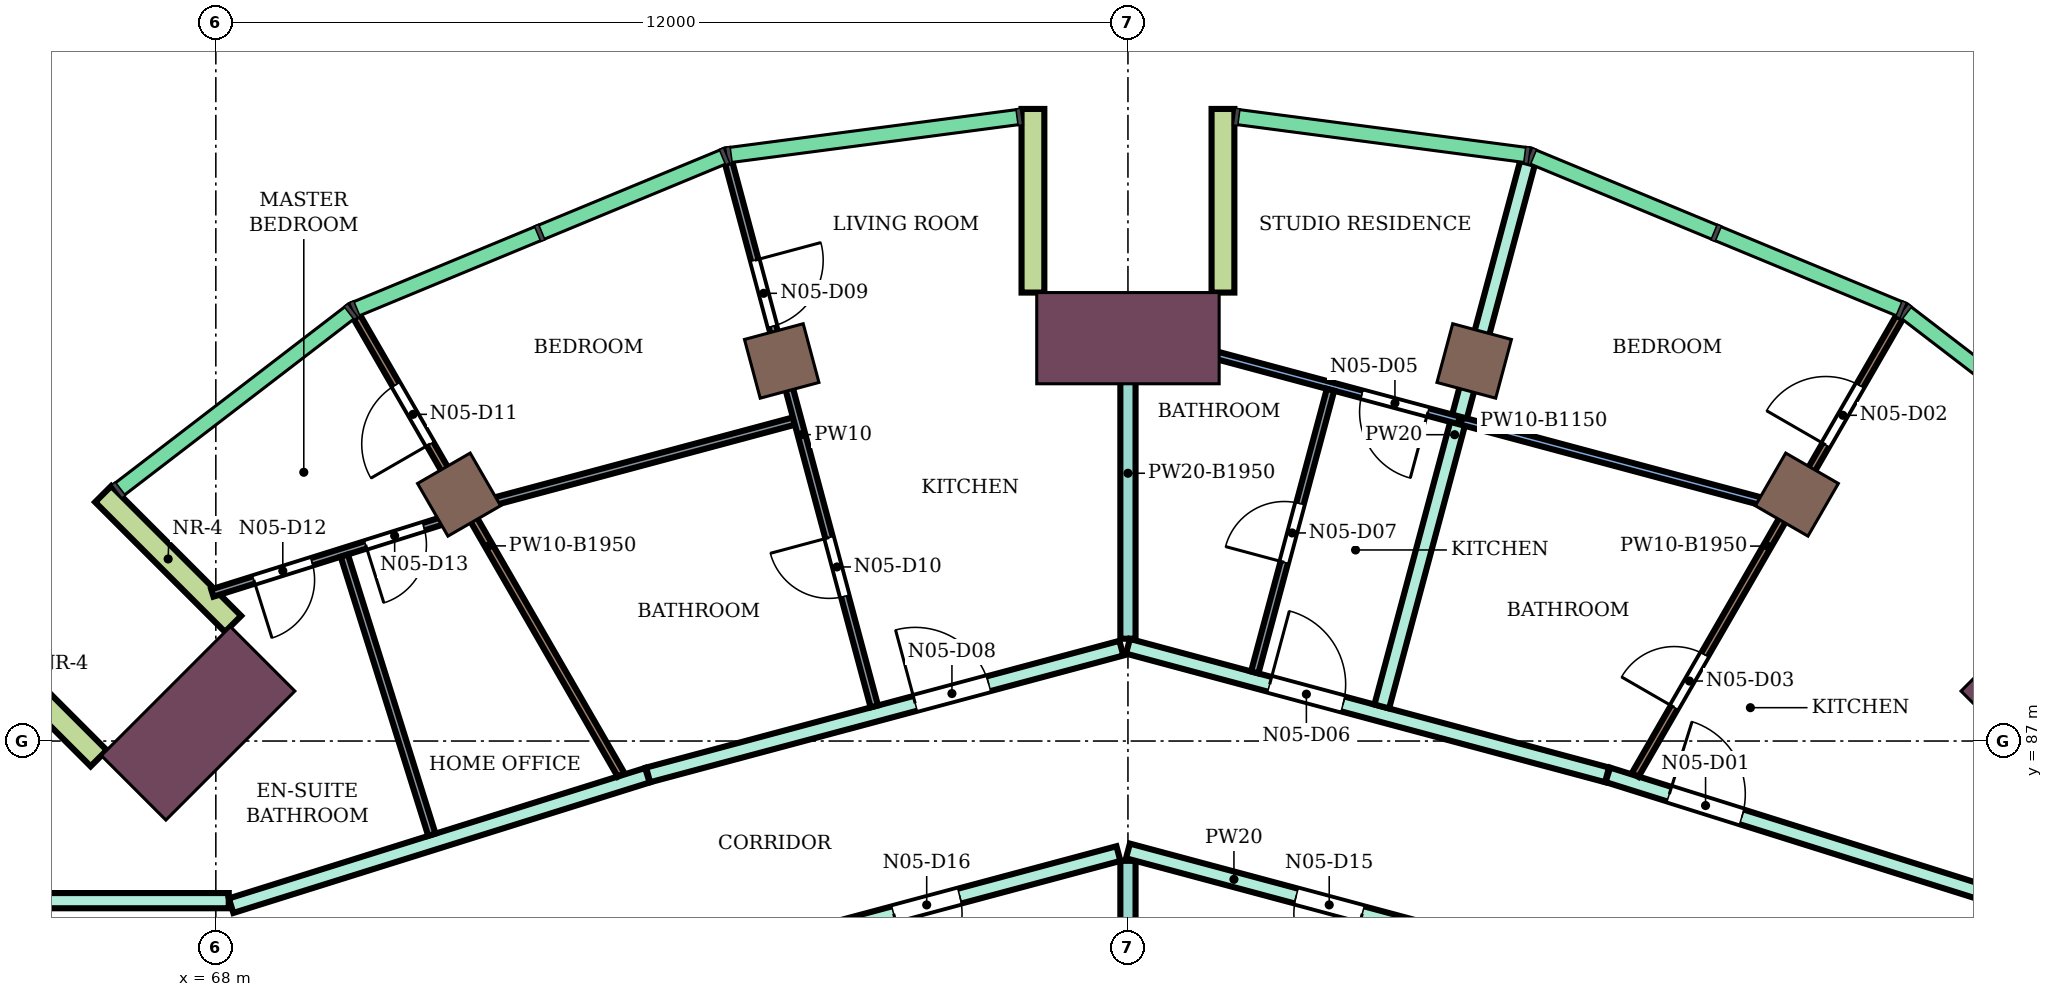
"""IFC4 building model, lengths in metres.
Left out: names, types, materials, properties, quantities, classifications, styles, units other than length and angle.
Written with IfcOpenShell. Run it as: python <this file> out.ifc"""

import sys

from ifc_helpers import new_model, si_unit, direction, frame, frame_2d, origin, origin_2d, place, context, subcontext, project, spatial, rectangle, extrude, element, fill, save


model = new_model("IFC4")
c1 = context("Model", 3, precision=1e-05, world=origin(), true_north=direction((0.0, 1.0)))
c2 = subcontext(c1, "Body", "Model", "MODEL_VIEW")
j1 = project(units=[si_unit("LENGTHUNIT", "METRE"), si_unit("PLANEANGLEUNIT", "RADIAN")], contexts=[c1])
p1 = place(None, origin())
s1 = spatial("IfcSite", under=j1, at=p1, CompositionType="ELEMENT")
p2 = place(p1, origin())
s2 = spatial("IfcBuilding", under=s1, at=p2, CompositionType="ELEMENT")
p3 = place(p2, frame((0.0, 0.0, 323.7)))
s3 = spatial("IfcBuildingStorey", under=s2, at=p3, CompositionType="ELEMENT", Elevation=323.7)
for number, where, z_axis, x_axis in (
    (1, (88.8, 90.242, 0.0), (0.0, 0.0, 1.0), (0.5, 0.866, 0.0)),
    (2, (84.555, 92.0, 0.0), (0.0, 0.0, 1.0), (0.259, 0.966, 0.0)),
    (3, (75.445, 92.0, 0.0), (0.0, 0.0, 1.0), (-0.259, 0.966, 0.0)),
    (4, (71.2, 90.242, 0.0), (0.0, 0.0, 1.0), (-0.5, 0.866, 0.0)),
):
    element("IfcColumn", number, at=place(p3, frame(where, z_axis=z_axis, x_axis=x_axis)), inside=s3, PredefinedType="COLUMN", context=c2, shape_type="SweptSolid", body=[
        extrude(rectangle(XDim=0.8, YDim=0.8, at=origin_2d()), origin(), (0.0, 0.0, 1.0), 4.4),
    ])
for number, where, z_axis, x_axis in (
    (5, (92.233, 87.233, 0.0), (0.0, 0.0, 1.0), (0.707, 0.707, 0.0)),
    (6, (80.0, 92.3, 0.0), (0.0, 0.0, 1.0), (0.0, 1.0, 0.0)),
    (7, (67.767, 87.233, 0.0), (0.0, 0.0, 1.0), (-0.707, 0.707, 0.0)),
):
    element("IfcColumn", number, at=place(p3, frame(where, z_axis=z_axis, x_axis=x_axis)), inside=s3, PredefinedType="COLUMN", context=c2, shape_type="SweptSolid", body=[
        extrude(rectangle(XDim=1.2, YDim=2.4, at=origin_2d()), origin(), (0.0, 0.0, 1.0), 4.4),
    ])
for number, where, z_axis, x_axis in (
    (8, (81.25, 92.9, 0.0), (0.0, 0.0, 1.0), (0.0, 1.0, 0.0)),
    (9, (78.75, 92.9, 0.0), (0.0, 0.0, 1.0), (0.0, 1.0, 0.0)),
    (10, (68.227, 88.541, 0.0), (0.0, 0.0, 1.0), (-0.707, 0.707, 0.0)),
    (11, (66.459, 86.773, 0.0), (0.0, 0.0, 1.0), (-0.707, 0.707, 0.0)),
):
    element("IfcWall", number, at=place(p3, frame(where, z_axis=z_axis, x_axis=x_axis)), inside=s3, PredefinedType="NOTDEFINED", context=c2, shape_type="SweptSolid", body=[
        extrude(rectangle(XDim=2.416, YDim=0.3, at=frame_2d((1.208, 0.0))), origin(), (0.0, 0.0, 1.0), 4.4),
    ])
p4 = place(p3, frame((65.2, 84.9, 0.0), z_axis=(0.0, 0.0, 1.0), x_axis=(1.0, 0.0, 0.0)))
e12 = element("IfcWall", 12, at=p4, inside=s3, PredefinedType="PARTITIONING", context=c2, shape_type="SweptSolid", body=[
    extrude(rectangle(XDim=2.97, YDim=0.2, at=frame_2d((1.485, 0.0))), origin(), (0.0, 0.0, 1.0), 3.95),
])
p5 = place(p3, frame((68.201, 84.834, 0.0), z_axis=(0.0, 0.0, 1.0), x_axis=(0.954232917497, 0.29906443982, 0.0)))
e13 = element("IfcWall", 13, at=p5, inside=s3, PredefinedType="PARTITIONING", context=c2, shape_type="SweptSolid", body=[
    extrude(rectangle(XDim=5.74, YDim=0.2, at=frame_2d((2.87, 0.0))), origin(), (0.0, 0.0, 1.0), 3.95),
])
p6 = place(p3, frame((73.687, 86.554, 0.0), z_axis=(0.0, 0.0, 1.0), x_axis=(0.96595903825, 0.258695064551, 0.0)))
e14 = element("IfcWall", 14, at=p6, inside=s3, PredefinedType="PARTITIONING", context=c2, shape_type="SweptSolid", body=[
    extrude(rectangle(XDim=6.446, YDim=0.2, at=frame_2d((3.223, 0.0))), origin(), (0.0, 0.0, 1.0), 3.95),
])
p7 = place(p6, frame((3.638, 0.0, 0.0)))
e15 = element("IfcOpeningElement", 15, at=p7, cuts=e14, PredefinedType="OPENING", context=c2, shape_type="SweptSolid", body=[
    extrude(rectangle(XDim=1.0, YDim=2.1, at=frame_2d((0.5, 1.05))), frame((0.0, 0.11, 0.0), z_axis=(0.0, -1.0, 0.0), x_axis=(1.0, 0.0, 0.0)), (0.0, 0.0, 1.0), 0.22),
])
p8 = place(p3, frame((74.413, 84.057, 0.0), z_axis=(0.0, 0.0, 1.0), x_axis=(0.965972135939, 0.258646153246, 0.0)))
e16 = element("IfcWall", 16, at=p8, inside=s3, PredefinedType="PARTITIONING", context=c2, shape_type="SweptSolid", body=[
    extrude(rectangle(XDim=5.654, YDim=0.2, at=frame_2d((2.827, 0.0))), origin(), (0.0, 0.0, 1.0), 3.95),
])
p9 = place(p8, frame((2.593, 0.0, 0.0)))
e17 = element("IfcOpeningElement", 17, at=p9, cuts=e16, PredefinedType="OPENING", context=c2, shape_type="SweptSolid", body=[
    extrude(rectangle(XDim=0.9, YDim=2.1, at=frame_2d((0.45, 1.05))), frame((0.0, 0.11, 0.0), z_axis=(0.0, -1.0, 0.0), x_axis=(1.0, 0.0, 0.0)), (0.0, 0.0, 1.0), 0.22),
])
p10 = place(p3, frame((80.0, 82.699, 0.0), z_axis=(0.0, 0.0, 1.0), x_axis=(0.0, 1.0, 0.0)))
e18 = element("IfcWall", 18, at=p10, inside=s3, PredefinedType="PARTITIONING", context=c2, shape_type="SweptSolid", body=[
    extrude(rectangle(XDim=2.725, YDim=0.2, at=frame_2d((1.363, 0.0))), origin(), (0.0, 0.0, 1.0), 2.45),
])
p11 = place(p3, frame((80.0, 85.554, 0.0), z_axis=(0.0, 0.0, 1.0), x_axis=(0.965928989968, -0.258807237802, 0.0)))
e19 = element("IfcWall", 19, at=p11, inside=s3, PredefinedType="PARTITIONING", context=c2, shape_type="SweptSolid", body=[
    extrude(rectangle(XDim=5.774, YDim=0.2, at=frame_2d((2.887, 0.0))), origin(), (0.0, 0.0, 1.0), 3.95),
])
p12 = place(p11, frame((2.292, 0.0, 0.0)))
e20 = element("IfcOpeningElement", 20, at=p12, cuts=e19, PredefinedType="OPENING", context=c2, shape_type="SweptSolid", body=[
    extrude(rectangle(XDim=0.9, YDim=2.1, at=frame_2d((0.45, 1.05))), frame((0.0, 0.11, 0.0), z_axis=(0.0, -1.0, 0.0), x_axis=(1.0, 0.0, 0.0)), (0.0, 0.0, 1.0), 0.22),
])
p13 = place(p3, frame((80.0, 88.346, 0.0), z_axis=(0.0, 0.0, 1.0), x_axis=(0.0, 1.0, 0.0)))
e21 = element("IfcWall", 21, at=p13, inside=s3, PredefinedType="PARTITIONING", context=c2, shape_type="SweptSolid", body=[
    extrude(rectangle(XDim=4.354, YDim=0.2, at=frame_2d((2.177, 0.0))), origin(), (0.0, 0.0, 1.0), 2.45),
])
p14 = place(p3, frame((80.0, 88.247, 0.0), z_axis=(0.0, 0.0, 1.0), x_axis=(0.965807659316, -0.259259648244, 0.0)))
e22 = element("IfcWall", 22, at=p14, inside=s3, PredefinedType="PARTITIONING", context=c2, shape_type="SweptSolid", body=[
    extrude(rectangle(XDim=6.526, YDim=0.2, at=frame_2d((3.263, 0.0))), origin(), (0.0, 0.0, 1.0), 3.95),
])
p15 = place(p14, frame((1.93, 0.0, 0.0)))
e23 = element("IfcOpeningElement", 23, at=p15, cuts=e22, PredefinedType="OPENING", context=c2, shape_type="SweptSolid", body=[
    extrude(rectangle(XDim=1.0, YDim=2.1, at=frame_2d((0.5, 1.05))), frame((0.0, 0.11, 0.0), z_axis=(0.0, -1.0, 0.0), x_axis=(1.0, 0.0, 0.0)), (0.0, 0.0, 1.0), 0.22),
])
p16 = place(p3, frame((83.339, 87.455, 0.0), z_axis=(0.0, 0.0, 1.0), x_axis=(0.258957498737, 0.965888717114, 0.0)))
e24 = element("IfcWall", 24, at=p16, inside=s3, PredefinedType="PARTITIONING", context=c2, shape_type="SweptSolid", body=[
    extrude(rectangle(XDim=7.404, YDim=0.2, at=frame_2d((3.702, 0.0))), origin(), (0.0, 0.0, 1.0), 3.95),
])
p17 = place(p3, frame((86.313, 86.555, 0.0), z_axis=(0.0, 0.0, 1.0), x_axis=(0.9540216201, -0.299737799389, 0.0)))
e25 = element("IfcWall", 25, at=p17, inside=s3, PredefinedType="PARTITIONING", context=c2, shape_type="SweptSolid", body=[
    extrude(rectangle(XDim=5.719, YDim=0.2, at=frame_2d((2.86, 0.0))), origin(), (0.0, 0.0, 1.0), 3.95),
])
p18 = place(p17, frame((0.848, 0.0, 0.0)))
e26 = element("IfcOpeningElement", 26, at=p18, cuts=e25, PredefinedType="OPENING", context=c2, shape_type="SweptSolid", body=[
    extrude(rectangle(XDim=1.0, YDim=2.1, at=frame_2d((0.5, 1.05))), frame((0.0, 0.11, 0.0), z_axis=(0.0, -1.0, 0.0), x_axis=(1.0, 0.0, 0.0)), (0.0, 0.0, 1.0), 0.22),
])
p19 = place(p3, frame((67.954, 88.948, 0.0), z_axis=(0.0, 0.0, 1.0), x_axis=(0.954122535632, 0.299416410704, 0.0)))
e27 = element("IfcWall", 27, at=p19, inside=s3, PredefinedType="PARTITIONING", context=c2, shape_type="SweptSolid", body=[
    extrude(rectangle(XDim=3.482, YDim=0.1, at=frame_2d((1.741, 0.0))), origin(), (0.0, 0.0, 1.0), 3.95),
])
p20 = place(p19, frame((0.571, 0.0, 0.0)))
e28 = element("IfcOpeningElement", 28, at=p20, cuts=e27, PredefinedType="OPENING", context=c2, shape_type="SweptSolid", body=[
    extrude(rectangle(XDim=0.8, YDim=2.1, at=frame_2d((0.4, 1.05))), frame((0.0, 0.06, 0.0), z_axis=(0.0, -1.0, 0.0), x_axis=(1.0, 0.0, 0.0)), (0.0, 0.0, 1.0), 0.12),
])
p21 = place(p19, frame((2.114, 0.0, 0.0)))
e29 = element("IfcOpeningElement", 29, at=p21, cuts=e27, PredefinedType="OPENING", context=c2, shape_type="SweptSolid", body=[
    extrude(rectangle(XDim=0.8, YDim=2.1, at=frame_2d((0.4, 1.05))), frame((0.0, 0.06, 0.0), z_axis=(0.0, -1.0, 0.0), x_axis=(1.0, 0.0, 0.0)), (0.0, 0.0, 1.0), 0.12),
])
p22 = place(p3, frame((69.69, 89.44, 0.0), z_axis=(0.0, 0.0, 1.0), x_axis=(0.299260814267, -0.954171349939, 0.0)))
e30 = element("IfcWall", 30, at=p22, inside=s3, PredefinedType="PARTITIONING", context=c2, shape_type="SweptSolid", body=[
    extrude(rectangle(XDim=3.849, YDim=0.1, at=frame_2d((1.925, 0.0))), origin(), (0.0, 0.0, 1.0), 3.95),
])
p23 = place(p3, frame((69.855, 92.579, 0.0), z_axis=(0.0, 0.0, 1.0), x_axis=(0.499801463163, -0.866139998742, 0.0)))
e31 = element("IfcWall", 31, at=p23, inside=s3, PredefinedType="PARTITIONING", context=c2, shape_type="SweptSolid", body=[
    extrude(rectangle(XDim=6.955, YDim=0.1, at=frame_2d((3.478, 0.0))), origin(), (0.0, 0.0, 1.0), 2.45),
])
p24 = place(p23, frame((1.029, 0.0, 0.0)))
e32 = element("IfcOpeningElement", 32, at=p24, cuts=e31, PredefinedType="OPENING", context=c2, shape_type="SweptSolid", body=[
    extrude(rectangle(XDim=0.9, YDim=2.1, at=frame_2d((0.45, 1.05))), frame((0.0, 0.06, 0.0), z_axis=(0.0, -1.0, 0.0), x_axis=(1.0, 0.0, 0.0)), (0.0, 0.0, 1.0), 0.12),
])
p25 = place(p3, frame((71.375, 90.075, 0.0), z_axis=(0.0, 0.0, 1.0), x_axis=(0.965918685896, 0.258845691944, 0.0)))
e33 = element("IfcWall", 33, at=p25, inside=s3, PredefinedType="PARTITIONING", context=c2, shape_type="SweptSolid", body=[
    extrude(rectangle(XDim=4.379, YDim=0.1, at=frame_2d((2.189, 0.0))), origin(), (0.0, 0.0, 1.0), 3.95),
])
p26 = place(p3, frame((74.747, 94.607, 0.0), z_axis=(0.0, 0.0, 1.0), x_axis=(0.258787180783, -0.965934363745, 0.0)))
e34 = element("IfcWall", 34, at=p26, inside=s3, PredefinedType="PARTITIONING", context=c2, shape_type="SweptSolid", body=[
    extrude(rectangle(XDim=7.404, YDim=0.1, at=frame_2d((3.702, 0.0))), origin(), (0.0, 0.0, 1.0), 3.95),
])
p27 = place(p26, frame((1.327, 0.0, 0.0)))
e35 = element("IfcOpeningElement", 35, at=p27, cuts=e34, PredefinedType="OPENING", context=c2, shape_type="SweptSolid", body=[
    extrude(rectangle(XDim=0.9, YDim=2.1, at=frame_2d((0.45, 1.05))), frame((0.0, 0.06, 0.0), z_axis=(0.0, -1.0, 0.0), x_axis=(1.0, 0.0, 0.0)), (0.0, 0.0, 1.0), 0.12),
])
p28 = place(p26, frame((5.104, 0.0, 0.0)))
e36 = element("IfcOpeningElement", 36, at=p28, cuts=e34, PredefinedType="OPENING", context=c2, shape_type="SweptSolid", body=[
    extrude(rectangle(XDim=0.8, YDim=2.1, at=frame_2d((0.4, 1.05))), frame((0.0, 0.06, 0.0), z_axis=(0.0, -1.0, 0.0), x_axis=(1.0, 0.0, 0.0)), (0.0, 0.0, 1.0), 0.12),
])
p29 = place(p3, frame((80.106, 92.359, 0.0), z_axis=(0.0, 0.0, 1.0), x_axis=(0.965889909151, -0.258953052501, 0.0)))
e37 = element("IfcWall", 37, at=p29, inside=s3, PredefinedType="PARTITIONING", context=c2, shape_type="SweptSolid", body=[
    extrude(rectangle(XDim=8.83, YDim=0.1, at=frame_2d((4.415, 0.0))), origin(), (0.0, 0.0, 1.0), 3.25),
])
p30 = place(p29, frame((3.076, 0.0, 0.0)))
e38 = element("IfcOpeningElement", 38, at=p30, cuts=e37, PredefinedType="OPENING", context=c2, shape_type="SweptSolid", body=[
    extrude(rectangle(XDim=0.9, YDim=2.1, at=frame_2d((0.45, 1.05))), frame((0.0, 0.06, 0.0), z_axis=(0.0, -1.0, 0.0), x_axis=(1.0, 0.0, 0.0)), (0.0, 0.0, 1.0), 0.12),
])
p31 = place(p3, frame((81.668, 87.903, 0.0), z_axis=(0.0, 0.0, 1.0), x_axis=(0.259020336752, 0.965871867873, 0.0)))
e39 = element("IfcWall", 39, at=p31, inside=s3, PredefinedType="PARTITIONING", context=c2, shape_type="SweptSolid", body=[
    extrude(rectangle(XDim=3.849, YDim=0.1, at=frame_2d((1.925, 0.0))), origin(), (0.0, 0.0, 1.0), 3.95),
])
p32 = place(p31, frame((1.5, 0.0, 0.0)))
e40 = element("IfcOpeningElement", 40, at=p32, cuts=e39, PredefinedType="OPENING", context=c2, shape_type="SweptSolid", body=[
    extrude(rectangle(XDim=0.8, YDim=2.1, at=frame_2d((0.4, 1.05))), frame((0.0, 0.06, 0.0), z_axis=(0.0, -1.0, 0.0), x_axis=(1.0, 0.0, 0.0)), (0.0, 0.0, 1.0), 0.12),
])
p33 = place(p3, frame((86.673, 86.553, 0.0), z_axis=(0.0, 0.0, 1.0), x_axis=(0.500103298341, 0.865965756245, 0.0)))
e41 = element("IfcWall", 41, at=p33, inside=s3, PredefinedType="PARTITIONING", context=c2, shape_type="SweptSolid", body=[
    extrude(rectangle(XDim=6.955, YDim=0.1, at=frame_2d((3.477, 0.0))), origin(), (0.0, 0.0, 1.0), 2.45),
])
p34 = place(p33, frame((5.015, 0.0, 0.0)))
e42 = element("IfcOpeningElement", 42, at=p34, cuts=e41, PredefinedType="OPENING", context=c2, shape_type="SweptSolid", body=[
    extrude(rectangle(XDim=0.9, YDim=2.1, at=frame_2d((0.45, 1.05))), frame((0.0, 0.06, 0.0), z_axis=(0.0, -1.0, 0.0), x_axis=(1.0, 0.0, 0.0)), (0.0, 0.0, 1.0), 0.12),
])
p35 = place(p33, frame((1.028, 0.0, 0.0)))
e43 = element("IfcOpeningElement", 43, at=p35, cuts=e41, PredefinedType="OPENING", context=c2, shape_type="SweptSolid", body=[
    extrude(rectangle(XDim=0.8, YDim=2.1, at=frame_2d((0.4, 1.05))), frame((0.0, 0.06, 0.0), z_axis=(0.0, -1.0, 0.0), x_axis=(1.0, 0.0, 0.0)), (0.0, 0.0, 1.0), 0.12),
])
p36 = place(p18, origin())
e44 = element("IfcDoor", 44, at=p36, inside=s3, OperationType="SINGLE_SWING_LEFT", PredefinedType="DOOR", context=c2, shape_type="SweptSolid", body=[
    extrude(rectangle(XDim=1.0, YDim=2.1, at=frame_2d((0.5, 1.05))), frame((0.0, 0.025, 0.0), z_axis=(0.0, -1.0, 0.0), x_axis=(1.0, 0.0, 0.0)), (0.0, 0.0, 1.0), 0.05),
])
fill(e26, e44)
p37 = place(p34, origin())
e45 = element("IfcDoor", 45, at=p37, inside=s3, OperationType="SINGLE_SWING_LEFT", PredefinedType="DOOR", context=c2, shape_type="SweptSolid", body=[
    extrude(rectangle(XDim=0.9, YDim=2.1, at=frame_2d((0.45, 1.05))), frame((0.0, 0.025, 0.0), z_axis=(0.0, -1.0, 0.0), x_axis=(1.0, 0.0, 0.0)), (0.0, 0.0, 1.0), 0.05),
])
fill(e42, e45)
p38 = place(p35, origin())
e46 = element("IfcDoor", 46, at=p38, inside=s3, OperationType="SINGLE_SWING_LEFT", PredefinedType="DOOR", context=c2, shape_type="SweptSolid", body=[
    extrude(rectangle(XDim=0.8, YDim=2.1, at=frame_2d((0.4, 1.05))), frame((0.0, 0.025, 0.0), z_axis=(0.0, -1.0, 0.0), x_axis=(1.0, 0.0, 0.0)), (0.0, 0.0, 1.0), 0.05),
])
fill(e43, e46)
p39 = place(p30, frame((0.9, 0.0, 0.0), z_axis=(0.0, 0.0, 1.0), x_axis=(-1.0, 0.0, 0.0)))
e47 = element("IfcDoor", 47, at=p39, inside=s3, OperationType="SINGLE_SWING_LEFT", PredefinedType="DOOR", context=c2, shape_type="SweptSolid", body=[
    extrude(rectangle(XDim=0.9, YDim=2.1, at=frame_2d((0.45, 1.05))), frame((0.0, 0.025, 0.0), z_axis=(0.0, -1.0, 0.0), x_axis=(1.0, 0.0, 0.0)), (0.0, 0.0, 1.0), 0.05),
])
fill(e38, e47)
p40 = place(p15, origin())
e48 = element("IfcDoor", 48, at=p40, inside=s3, OperationType="SINGLE_SWING_LEFT", PredefinedType="DOOR", context=c2, shape_type="SweptSolid", body=[
    extrude(rectangle(XDim=1.0, YDim=2.1, at=frame_2d((0.5, 1.05))), frame((0.0, 0.025, 0.0), z_axis=(0.0, -1.0, 0.0), x_axis=(1.0, 0.0, 0.0)), (0.0, 0.0, 1.0), 0.05),
])
fill(e23, e48)
p41 = place(p32, origin())
e49 = element("IfcDoor", 49, at=p41, inside=s3, OperationType="SINGLE_SWING_LEFT", PredefinedType="DOOR", context=c2, shape_type="SweptSolid", body=[
    extrude(rectangle(XDim=0.8, YDim=2.1, at=frame_2d((0.4, 1.05))), frame((0.0, 0.025, 0.0), z_axis=(0.0, -1.0, 0.0), x_axis=(1.0, 0.0, 0.0)), (0.0, 0.0, 1.0), 0.05),
])
fill(e40, e49)
p42 = place(p7, origin())
e50 = element("IfcDoor", 50, at=p42, inside=s3, OperationType="SINGLE_SWING_LEFT", PredefinedType="DOOR", context=c2, shape_type="SweptSolid", body=[
    extrude(rectangle(XDim=1.0, YDim=2.1, at=frame_2d((0.5, 1.05))), frame((0.0, 0.025, 0.0), z_axis=(0.0, -1.0, 0.0), x_axis=(1.0, 0.0, 0.0)), (0.0, 0.0, 1.0), 0.05),
])
fill(e15, e50)
p43 = place(p27, origin())
e51 = element("IfcDoor", 51, at=p43, inside=s3, OperationType="SINGLE_SWING_LEFT", PredefinedType="DOOR", context=c2, shape_type="SweptSolid", body=[
    extrude(rectangle(XDim=0.9, YDim=2.1, at=frame_2d((0.45, 1.05))), frame((0.0, 0.025, 0.0), z_axis=(0.0, -1.0, 0.0), x_axis=(1.0, 0.0, 0.0)), (0.0, 0.0, 1.0), 0.05),
])
fill(e35, e51)
p44 = place(p28, frame((0.8, 0.0, 0.0), z_axis=(0.0, 0.0, 1.0), x_axis=(-1.0, 0.0, 0.0)))
e52 = element("IfcDoor", 52, at=p44, inside=s3, OperationType="SINGLE_SWING_RIGHT", PredefinedType="DOOR", context=c2, shape_type="SweptSolid", body=[
    extrude(rectangle(XDim=0.8, YDim=2.1, at=frame_2d((0.4, 1.05))), frame((0.0, 0.025, 0.0), z_axis=(0.0, -1.0, 0.0), x_axis=(1.0, 0.0, 0.0)), (0.0, 0.0, 1.0), 0.05),
])
fill(e36, e52)
p45 = place(p24, frame((0.9, 0.0, 0.0), z_axis=(0.0, 0.0, 1.0), x_axis=(-1.0, 0.0, 0.0)))
e53 = element("IfcDoor", 53, at=p45, inside=s3, OperationType="SINGLE_SWING_LEFT", PredefinedType="DOOR", context=c2, shape_type="SweptSolid", body=[
    extrude(rectangle(XDim=0.9, YDim=2.1, at=frame_2d((0.45, 1.05))), frame((0.0, 0.025, 0.0), z_axis=(0.0, -1.0, 0.0), x_axis=(1.0, 0.0, 0.0)), (0.0, 0.0, 1.0), 0.05),
])
fill(e32, e53)
p46 = place(p20, frame((0.8, 0.0, 0.0), z_axis=(0.0, 0.0, 1.0), x_axis=(-1.0, 0.0, 0.0)))
e54 = element("IfcDoor", 54, at=p46, inside=s3, OperationType="SINGLE_SWING_RIGHT", PredefinedType="DOOR", context=c2, shape_type="SweptSolid", body=[
    extrude(rectangle(XDim=0.8, YDim=2.1, at=frame_2d((0.4, 1.05))), frame((0.0, 0.025, 0.0), z_axis=(0.0, -1.0, 0.0), x_axis=(1.0, 0.0, 0.0)), (0.0, 0.0, 1.0), 0.05),
])
fill(e28, e54)
p47 = place(p21, frame((0.8, 0.0, 0.0), z_axis=(0.0, 0.0, 1.0), x_axis=(-1.0, 0.0, 0.0)))
e55 = element("IfcDoor", 55, at=p47, inside=s3, OperationType="SINGLE_SWING_RIGHT", PredefinedType="DOOR", context=c2, shape_type="SweptSolid", body=[
    extrude(rectangle(XDim=0.8, YDim=2.1, at=frame_2d((0.4, 1.05))), frame((0.0, 0.025, 0.0), z_axis=(0.0, -1.0, 0.0), x_axis=(1.0, 0.0, 0.0)), (0.0, 0.0, 1.0), 0.05),
])
fill(e29, e55)
p48 = place(p12, frame((0.9, 0.0, 0.0), z_axis=(0.0, 0.0, 1.0), x_axis=(-1.0, 0.0, 0.0)))
e56 = element("IfcDoor", 56, at=p48, inside=s3, OperationType="SINGLE_SWING_LEFT", PredefinedType="DOOR", context=c2, shape_type="SweptSolid", body=[
    extrude(rectangle(XDim=0.9, YDim=2.1, at=frame_2d((0.45, 1.05))), frame((0.0, 0.025, 0.0), z_axis=(0.0, -1.0, 0.0), x_axis=(1.0, 0.0, 0.0)), (0.0, 0.0, 1.0), 0.05),
])
fill(e20, e56)
p49 = place(p9, frame((0.9, 0.0, 0.0), z_axis=(0.0, 0.0, 1.0), x_axis=(-1.0, 0.0, 0.0)))
e57 = element("IfcDoor", 57, at=p49, inside=s3, OperationType="SINGLE_SWING_RIGHT", PredefinedType="DOOR", context=c2, shape_type="SweptSolid", body=[
    extrude(rectangle(XDim=0.9, YDim=2.1, at=frame_2d((0.45, 1.05))), frame((0.0, 0.025, 0.0), z_axis=(0.0, -1.0, 0.0), x_axis=(1.0, 0.0, 0.0)), (0.0, 0.0, 1.0), 0.05),
])
fill(e17, e57)
save(model, sys.argv[1])
